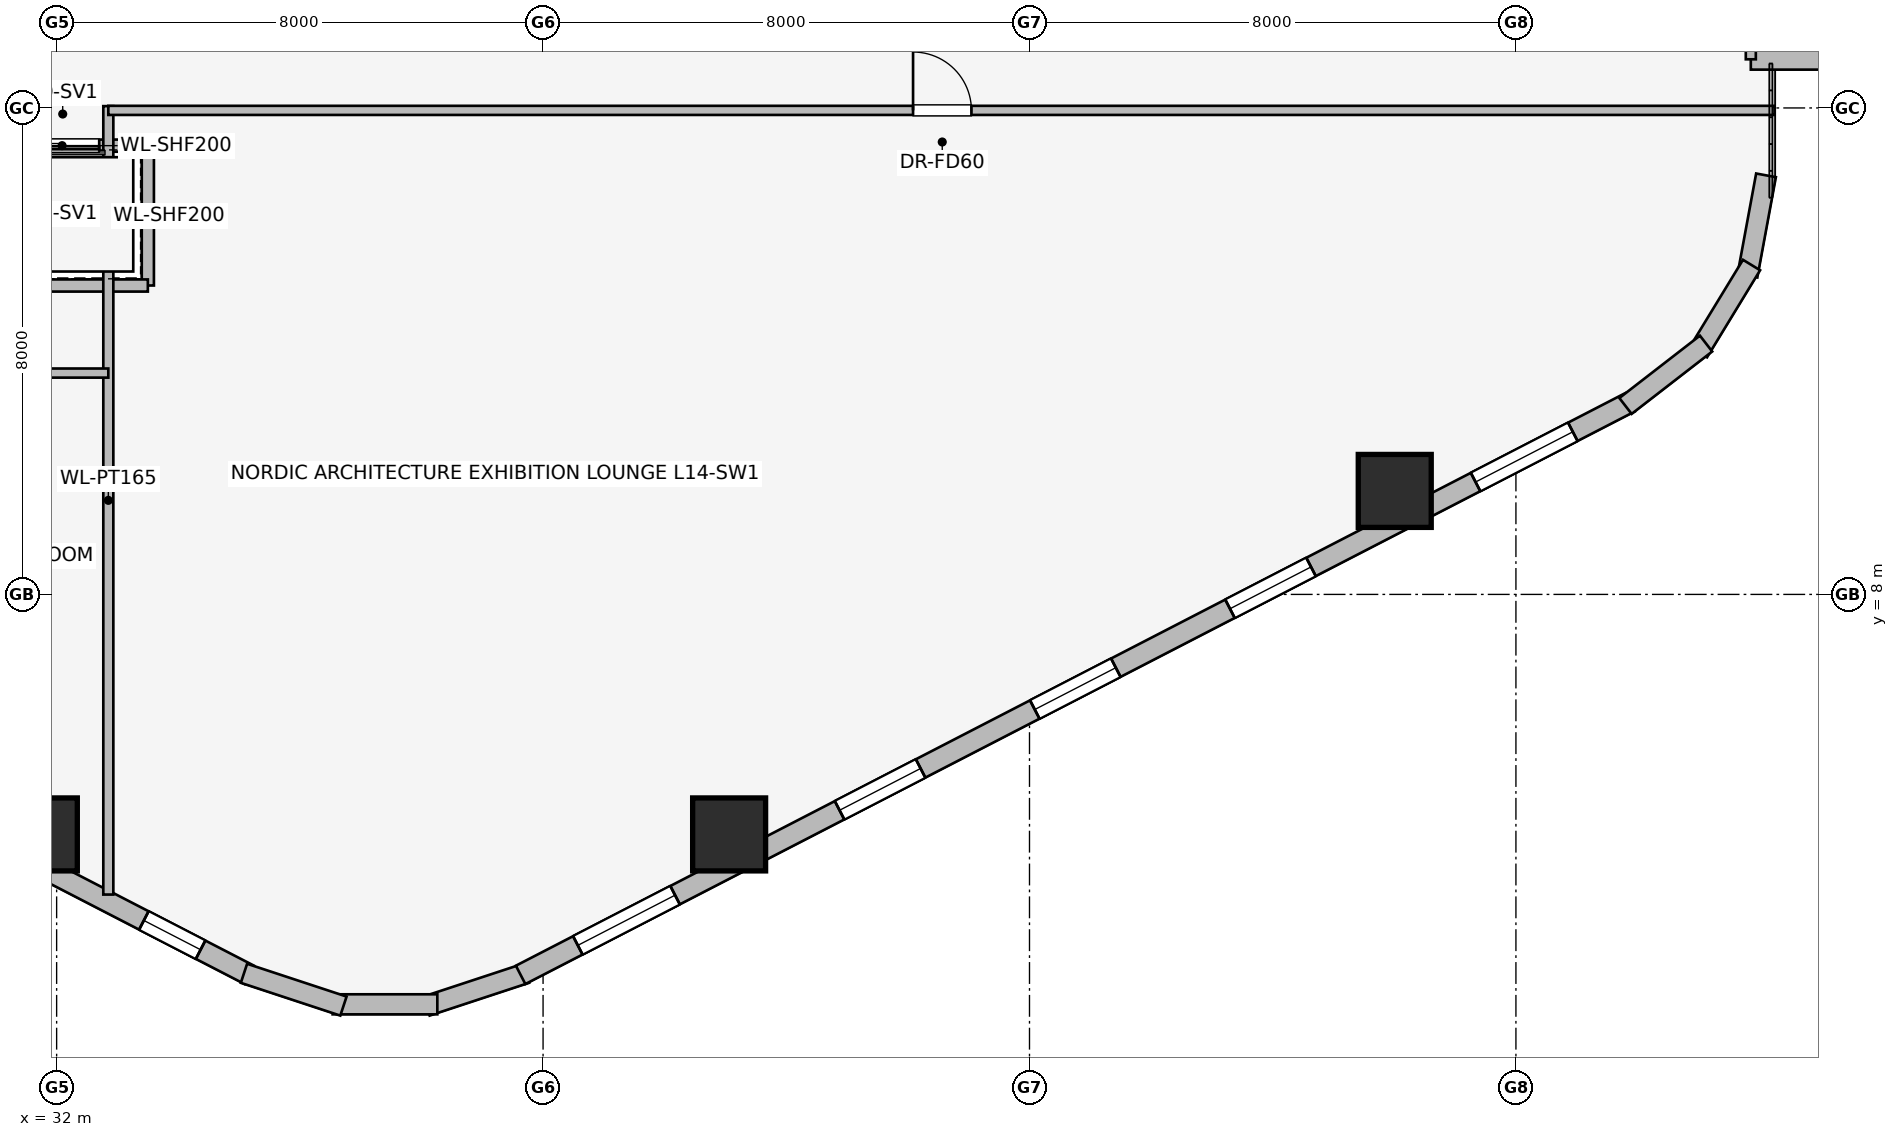
"""IFC4 building model, lengths in metres.
Left out: names, types, materials, properties, quantities, classifications, styles, units other than length and angle.
Written with IfcOpenShell. Run it as: python <this file> out.ifc"""

import sys

from ifc_helpers import new_model, si_unit, direction, frame, frame_2d, origin, origin_2d, place, context, subcontext, project, spatial, rectangle, extrude, element, fill, save


model = new_model("IFC4")
c1 = context("Model", 3, precision=1e-05, world=origin(), true_north=direction((0.0, 1.0)))
c2 = subcontext(c1, "Body", "Model", "MODEL_VIEW")
j1 = project(units=[si_unit("LENGTHUNIT", "METRE"), si_unit("PLANEANGLEUNIT", "RADIAN")], contexts=[c1])
p1 = place(None, origin())
s1 = spatial("IfcSite", under=j1, at=p1, CompositionType="ELEMENT")
p2 = place(p1, origin())
s2 = spatial("IfcBuilding", under=s1, at=p2, CompositionType="ELEMENT")
p3 = place(p2, frame((0.0, 0.0, 56.2)))
s3 = spatial("IfcBuildingStorey", under=s2, at=p3, CompositionType="ELEMENT", Elevation=56.2)
for number, where, z_axis, x_axis in (
    (1, (31.74, 4.053, 0.0), (0.0, 0.0, 1.0), (1.0, 0.0, 0.0)),
    (2, (43.06, 4.053, 0.0), (0.0, 0.0, 1.0), (1.0, 0.0, 0.0)),
    (3, (54.007, 9.702, 0.0), (0.0, 0.0, 1.0), (1.0, 0.0, 0.0)),
):
    element("IfcColumn", number, at=place(p3, frame(where, z_axis=z_axis, x_axis=x_axis)), inside=s3, PredefinedType="COLUMN", context=c2, shape_type="SweptSolid", body=[
        extrude(rectangle(XDim=1.2, YDim=1.2, at=origin_2d()), origin(), (0.0, 0.0, 1.0), 3.65),
    ])
p4 = place(p3, frame((35.169, 1.743, 0.0), z_axis=(0.0, 0.0, 1.0), x_axis=(-0.888634413993, 0.458616264721, 0.0)))
e4 = element("IfcWall", 4, at=p4, inside=s3, PredefinedType="STANDARD", context=c2, shape_type="SweptSolid", body=[
    extrude(rectangle(XDim=20.531, YDim=0.34, at=frame_2d((10.266, 0.0))), origin(), (0.0, 0.0, 1.0), 2.654),
])
p5 = place(p4, frame((0.902, 0.0, 0.75)))
e5 = element("IfcOpeningElement", 5, at=p5, cuts=e4, PredefinedType="OPENING", context=c2, shape_type="SweptSolid", body=[
    extrude(rectangle(XDim=1.05, YDim=1.4, at=frame_2d((0.525, 0.7))), frame((0.0, 0.18, 0.0), z_axis=(0.0, -1.0, 0.0), x_axis=(1.0, 0.0, 0.0)), (0.0, 0.0, 1.0), 0.36),
])
p6 = place(p4, frame((5.903, 0.0, 0.75)))
e6 = element("IfcOpeningElement", 6, at=p6, cuts=e4, PredefinedType="OPENING", context=c2, shape_type="SweptSolid", body=[
    extrude(rectangle(XDim=1.5, YDim=1.5, at=frame_2d((0.75, 0.75))), frame((0.0, 0.18, 0.0), z_axis=(0.0, -1.0, 0.0), x_axis=(1.0, 0.0, 0.0)), (0.0, 0.0, 1.0), 0.36),
])
p7 = place(p4, frame((9.516, 0.0, 0.75)))
e7 = element("IfcOpeningElement", 7, at=p7, cuts=e4, PredefinedType="OPENING", context=c2, shape_type="SweptSolid", body=[
    extrude(rectangle(XDim=1.5, YDim=1.5, at=frame_2d((0.75, 0.75))), frame((0.0, 0.18, 0.0), z_axis=(0.0, -1.0, 0.0), x_axis=(1.0, 0.0, 0.0)), (0.0, 0.0, 1.0), 0.36),
])
p8 = place(p4, frame((13.129, 0.0, 0.75)))
e8 = element("IfcOpeningElement", 8, at=p8, cuts=e4, PredefinedType="OPENING", context=c2, shape_type="SweptSolid", body=[
    extrude(rectangle(XDim=1.5, YDim=1.5, at=frame_2d((0.75, 0.75))), frame((0.0, 0.18, 0.0), z_axis=(0.0, -1.0, 0.0), x_axis=(1.0, 0.0, 0.0)), (0.0, 0.0, 1.0), 0.36),
])
p9 = place(p4, frame((17.673, 0.0, 0.75)))
e9 = element("IfcOpeningElement", 9, at=p9, cuts=e4, PredefinedType="OPENING", context=c2, shape_type="SweptSolid", body=[
    extrude(rectangle(XDim=1.8, YDim=1.5, at=frame_2d((0.9, 0.75))), frame((0.0, 0.18, 0.0), z_axis=(0.0, -1.0, 0.0), x_axis=(1.0, 0.0, 0.0)), (0.0, 0.0, 1.0), 0.36),
])
p10 = place(p3, frame((39.719, 1.769, 0.0), z_axis=(0.0, 0.0, 1.0), x_axis=(-0.94976901097, -0.312951794691, 0.0)))
e10 = element("IfcWall", 10, at=p10, inside=s3, PredefinedType="STANDARD", context=c2, shape_type="SweptSolid", body=[
    extrude(rectangle(XDim=1.722, YDim=0.33, at=frame_2d((0.861, 0.0))), origin(), (0.0, 0.0, 1.0), 3.36),
])
p11 = place(p3, frame((38.261, 1.259, 0.0), z_axis=(0.0, 0.0, 1.0), x_axis=(-1.0, 0.0, 0.0)))
e11 = element("IfcWall", 11, at=p11, inside=s3, PredefinedType="STANDARD", context=c2, shape_type="SweptSolid", body=[
    extrude(rectangle(XDim=1.722, YDim=0.33, at=frame_2d((0.861, 0.0))), origin(), (0.0, 0.0, 1.0), 3.36),
])
p12 = place(p3, frame((36.717, 1.23, 0.0), z_axis=(0.0, 0.0, 1.0), x_axis=(-0.94976901097, 0.312951794691, 0.0)))
e12 = element("IfcWall", 12, at=p12, inside=s3, PredefinedType="STANDARD", context=c2, shape_type="SweptSolid", body=[
    extrude(rectangle(XDim=1.722, YDim=0.33, at=frame_2d((0.861, 0.0))), origin(), (0.0, 0.0, 1.0), 3.36),
])
p13 = place(p3, frame((57.876, 11.159, 0.0), z_axis=(0.0, 0.0, 1.0), x_axis=(-0.888634413993, -0.458616264721, 0.0)))
e13 = element("IfcWall", 13, at=p13, inside=s3, PredefinedType="STANDARD", context=c2, shape_type="SweptSolid", body=[
    extrude(rectangle(XDim=20.531, YDim=0.34, at=frame_2d((10.266, 0.0))), origin(), (0.0, 0.0, 1.0), 2.654),
])
p14 = place(p13, frame((1.058, 0.0, 0.75)))
e14 = element("IfcOpeningElement", 14, at=p14, cuts=e13, PredefinedType="OPENING", context=c2, shape_type="SweptSolid", body=[
    extrude(rectangle(XDim=1.8, YDim=1.5, at=frame_2d((0.9, 0.75))), frame((0.0, 0.18, 0.0), z_axis=(0.0, -1.0, 0.0), x_axis=(1.0, 0.0, 0.0)), (0.0, 0.0, 1.0), 0.36),
])
p15 = place(p13, frame((5.903, 0.0, 0.75)))
e15 = element("IfcOpeningElement", 15, at=p15, cuts=e13, PredefinedType="OPENING", context=c2, shape_type="SweptSolid", body=[
    extrude(rectangle(XDim=1.5, YDim=1.5, at=frame_2d((0.75, 0.75))), frame((0.0, 0.18, 0.0), z_axis=(0.0, -1.0, 0.0), x_axis=(1.0, 0.0, 0.0)), (0.0, 0.0, 1.0), 0.36),
])
p16 = place(p13, frame((9.516, 0.0, 0.75)))
e16 = element("IfcOpeningElement", 16, at=p16, cuts=e13, PredefinedType="OPENING", context=c2, shape_type="SweptSolid", body=[
    extrude(rectangle(XDim=1.5, YDim=1.5, at=frame_2d((0.75, 0.75))), frame((0.0, 0.18, 0.0), z_axis=(0.0, -1.0, 0.0), x_axis=(1.0, 0.0, 0.0)), (0.0, 0.0, 1.0), 0.36),
])
p17 = place(p13, frame((13.129, 0.0, 0.75)))
e17 = element("IfcOpeningElement", 17, at=p17, cuts=e13, PredefinedType="OPENING", context=c2, shape_type="SweptSolid", body=[
    extrude(rectangle(XDim=1.5, YDim=1.5, at=frame_2d((0.75, 0.75))), frame((0.0, 0.18, 0.0), z_axis=(0.0, -1.0, 0.0), x_axis=(1.0, 0.0, 0.0)), (0.0, 0.0, 1.0), 0.36),
])
p18 = place(p13, frame((17.673, 0.0, 0.75)))
e18 = element("IfcOpeningElement", 18, at=p18, cuts=e13, PredefinedType="OPENING", context=c2, shape_type="SweptSolid", body=[
    extrude(rectangle(XDim=1.8, YDim=1.5, at=frame_2d((0.9, 0.75))), frame((0.0, 0.18, 0.0), z_axis=(0.0, -1.0, 0.0), x_axis=(1.0, 0.0, 0.0)), (0.0, 0.0, 1.0), 0.36),
])
p19 = place(p3, frame((60.113, 14.892, 0.0), z_axis=(0.0, 0.0, 1.0), x_axis=(-0.181714143354, -0.983351397063, 0.0)))
e19 = element("IfcWall", 19, at=p19, inside=s3, PredefinedType="STANDARD", context=c2, shape_type="SweptSolid", body=[
    extrude(rectangle(XDim=1.678, YDim=0.33, at=frame_2d((0.839, 0.0))), origin(), (0.0, 0.0, 1.0), 3.36),
])
p20 = place(p3, frame((59.875, 13.417, 0.0), z_axis=(0.0, 0.0, 1.0), x_axis=(-0.520584129191, -0.853810379671, 0.0)))
e20 = element("IfcWall", 20, at=p20, inside=s3, PredefinedType="STANDARD", context=c2, shape_type="SweptSolid", body=[
    extrude(rectangle(XDim=1.677, YDim=0.33, at=frame_2d((0.838, 0.0))), origin(), (0.0, 0.0, 1.0), 3.36),
])
p21 = place(p3, frame((59.127, 12.125, 0.0), z_axis=(0.0, 0.0, 1.0), x_axis=(-0.790691856293, -0.61221433207, 0.0)))
e21 = element("IfcWall", 21, at=p21, inside=s3, PredefinedType="STANDARD", context=c2, shape_type="SweptSolid", body=[
    extrude(rectangle(XDim=1.676, YDim=0.33, at=frame_2d((0.838, 0.0))), origin(), (0.0, 0.0, 1.0), 3.36),
])
p22 = place(p3, frame((78.863, 16.8, 0.0), z_axis=(0.0, 0.0, 1.0), x_axis=(-1.0, 0.0, 0.0)))
e22 = element("IfcWall", 22, at=p22, inside=s3, PredefinedType="STANDARD", context=c2, shape_type="SweptSolid", body=[
    extrude(rectangle(XDim=19.0, YDim=0.34, at=frame_2d((9.5, 0.0))), origin(), (0.0, 0.0, 1.0), 3.36),
])
p23 = place(p22, frame((2.633, 0.0, 0.75)))
e23 = element("IfcOpeningElement", 23, at=p23, cuts=e22, PredefinedType="OPENING", context=c2, shape_type="SweptSolid", body=[
    extrude(rectangle(XDim=1.8, YDim=1.5, at=frame_2d((0.9, 0.75))), frame((0.0, 0.18, 0.0), z_axis=(0.0, -1.0, 0.0), x_axis=(1.0, 0.0, 0.0)), (0.0, 0.0, 1.0), 0.36),
])
p24 = place(p22, frame((8.6, 0.0, 0.75)))
e24 = element("IfcOpeningElement", 24, at=p24, cuts=e22, PredefinedType="OPENING", context=c2, shape_type="SweptSolid", body=[
    extrude(rectangle(XDim=1.8, YDim=1.5, at=frame_2d((0.9, 0.75))), frame((0.0, 0.18, 0.0), z_axis=(0.0, -1.0, 0.0), x_axis=(1.0, 0.0, 0.0)), (0.0, 0.0, 1.0), 0.36),
])
p25 = place(p22, frame((14.567, 0.0, 0.75)))
e25 = element("IfcOpeningElement", 25, at=p25, cuts=e22, PredefinedType="OPENING", context=c2, shape_type="SweptSolid", body=[
    extrude(rectangle(XDim=1.8, YDim=1.5, at=frame_2d((0.9, 0.75))), frame((0.0, 0.18, 0.0), z_axis=(0.0, -1.0, 0.0), x_axis=(1.0, 0.0, 0.0)), (0.0, 0.0, 1.0), 0.36),
])
p26 = place(p3, frame((33.5, 15.38, 0.0), z_axis=(0.0, 0.0, 1.0), x_axis=(-1.0, 0.0, 0.0)))
e26 = element("IfcWall", 26, at=p26, inside=s3, PredefinedType="PARTITIONING", context=c2, shape_type="SweptSolid", body=[
    extrude(rectangle(XDim=2.82, YDim=0.2, at=frame_2d((1.41, 0.0))), origin(), (0.0, 0.0, 1.0), 3.36),
])
p27 = place(p26, frame((0.8, 0.0, 0.0)))
e27 = element("IfcOpeningElement", 27, at=p27, cuts=e26, PredefinedType="OPENING", context=c2, shape_type="SweptSolid", body=[
    extrude(rectangle(XDim=1.2, YDim=2.2, at=frame_2d((0.6, 1.1))), frame((0.0, 0.11, 0.0), z_axis=(0.0, -1.0, 0.0), x_axis=(1.0, 0.0, 0.0)), (0.0, 0.0, 1.0), 0.22),
])
p28 = place(p3, frame((33.5, 13.08, 0.0), z_axis=(0.0, 0.0, 1.0), x_axis=(0.0, 1.0, 0.0)))
e28 = element("IfcWall", 28, at=p28, inside=s3, PredefinedType="PARTITIONING", context=c2, shape_type="SweptSolid", body=[
    extrude(rectangle(XDim=2.3, YDim=0.2, at=frame_2d((1.15, 0.0))), origin(), (0.0, 0.0, 1.0), 3.36),
])
p29 = place(p3, frame((30.879, 13.08, 0.0), z_axis=(0.0, 0.0, 1.0), x_axis=(1.0, 0.0, 0.0)))
e29 = element("IfcWall", 29, at=p29, inside=s3, PredefinedType="PARTITIONING", context=c2, shape_type="SweptSolid", body=[
    extrude(rectangle(XDim=2.621, YDim=0.2, at=frame_2d((1.311, 0.0))), origin(), (0.0, 0.0, 1.0), 3.36),
])
p30 = place(p3, frame((32.85, 3.064, 0.0), z_axis=(0.0, 0.0, 1.0), x_axis=(0.0, 1.0, 0.0)))
e30 = element("IfcWall", 30, at=p30, inside=s3, PredefinedType="PARTITIONING", context=c2, shape_type="SweptSolid", body=[
    extrude(rectangle(XDim=12.966, YDim=0.165, at=frame_2d((6.483, 0.0))), origin(), (0.0, 0.0, 1.0), 3.36),
])
p31 = place(p3, frame((16.487, 11.64, 0.0), z_axis=(0.0, 0.0, 1.0), x_axis=(1.0, 0.0, 0.0)))
e31 = element("IfcWall", 31, at=p31, inside=s3, PredefinedType="PARTITIONING", context=c2, shape_type="SweptSolid", body=[
    extrude(rectangle(XDim=16.363, YDim=0.15, at=frame_2d((8.182, 0.0))), origin(), (0.0, 0.0, 1.0), 3.36),
])
p32 = place(p31, frame((6.513, 0.0, 0.0)))
e32 = element("IfcOpeningElement", 32, at=p32, cuts=e31, PredefinedType="OPENING", context=c2, shape_type="SweptSolid", body=[
    extrude(rectangle(XDim=0.9, YDim=2.0, at=frame_2d((0.45, 1.0))), frame((0.0, 0.085, 0.0), z_axis=(0.0, -1.0, 0.0), x_axis=(1.0, 0.0, 0.0)), (0.0, 0.0, 1.0), 0.17),
])
p33 = place(p3, frame((32.85, 15.96, 0.0), z_axis=(0.0, 0.0, 1.0), x_axis=(1.0, 0.0, 0.0)))
e33 = element("IfcWall", 33, at=p33, inside=s3, PredefinedType="PARTITIONING", context=c2, shape_type="SweptSolid", body=[
    extrude(rectangle(XDim=27.403, YDim=0.15, at=frame_2d((13.701, 0.0))), origin(), (0.0, 0.0, 1.0), 3.36),
])
p34 = place(p33, frame((13.235, 0.0, 0.0)))
e34 = element("IfcOpeningElement", 34, at=p34, cuts=e33, PredefinedType="OPENING", context=c2, shape_type="SweptSolid", body=[
    extrude(rectangle(XDim=0.96, YDim=2.0, at=frame_2d((0.48, 1.0))), frame((0.0, 0.085, 0.0), z_axis=(0.0, -1.0, 0.0), x_axis=(1.0, 0.0, 0.0)), (0.0, 0.0, 1.0), 0.17),
])
p35 = place(p3, frame((59.863, 16.8, 0.0), z_axis=(0.0, 0.0, 1.0), x_axis=(0.0, 1.0, 0.0)))
e35 = element("IfcWall", 35, at=p35, inside=s3, PredefinedType="PARTITIONING", context=c2, shape_type="SweptSolid", body=[
    extrude(rectangle(XDim=14.4, YDim=0.165, at=frame_2d((7.2, 0.0))), origin(), (0.0, 0.0, 1.0), 2.654),
])
p36 = place(p35, frame((2.45, 0.0, 0.0)))
e36 = element("IfcOpeningElement", 36, at=p36, cuts=e35, PredefinedType="OPENING", context=c2, shape_type="SweptSolid", body=[
    extrude(rectangle(XDim=0.96, YDim=2.0, at=frame_2d((0.48, 1.0))), frame((0.0, 0.093, 0.0), z_axis=(0.0, -1.0, 0.0), x_axis=(1.0, 0.0, 0.0)), (0.0, 0.0, 1.0), 0.185),
])
p37 = place(p5, origin())
e37 = element("IfcWindow", 37, at=p37, inside=s3, PartitioningType="SINGLE_PANEL", PredefinedType="WINDOW", context=c2, shape_type="SweptSolid", body=[
    extrude(rectangle(XDim=1.05, YDim=1.4, at=frame_2d((0.525, 0.7))), frame((0.0, 0.03, 0.0), z_axis=(0.0, -1.0, 0.0), x_axis=(1.0, 0.0, 0.0)), (0.0, 0.0, 1.0), 0.06),
])
fill(e5, e37)
p38 = place(p14, origin())
e38 = element("IfcWindow", 38, at=p38, inside=s3, PartitioningType="SINGLE_PANEL", PredefinedType="WINDOW", context=c2, shape_type="SweptSolid", body=[
    extrude(rectangle(XDim=1.8, YDim=1.5, at=frame_2d((0.9, 0.75))), frame((0.0, 0.03, 0.0), z_axis=(0.0, -1.0, 0.0), x_axis=(1.0, 0.0, 0.0)), (0.0, 0.0, 1.0), 0.06),
])
fill(e14, e38)
p39 = place(p15, origin())
e39 = element("IfcWindow", 39, at=p39, inside=s3, PartitioningType="SINGLE_PANEL", PredefinedType="WINDOW", context=c2, shape_type="SweptSolid", body=[
    extrude(rectangle(XDim=1.5, YDim=1.5, at=frame_2d((0.75, 0.75))), frame((0.0, 0.03, 0.0), z_axis=(0.0, -1.0, 0.0), x_axis=(1.0, 0.0, 0.0)), (0.0, 0.0, 1.0), 0.06),
])
fill(e15, e39)
p40 = place(p16, origin())
e40 = element("IfcWindow", 40, at=p40, inside=s3, PartitioningType="SINGLE_PANEL", PredefinedType="WINDOW", context=c2, shape_type="SweptSolid", body=[
    extrude(rectangle(XDim=1.5, YDim=1.5, at=frame_2d((0.75, 0.75))), frame((0.0, 0.03, 0.0), z_axis=(0.0, -1.0, 0.0), x_axis=(1.0, 0.0, 0.0)), (0.0, 0.0, 1.0), 0.06),
])
fill(e16, e40)
p41 = place(p17, origin())
e41 = element("IfcWindow", 41, at=p41, inside=s3, PartitioningType="SINGLE_PANEL", PredefinedType="WINDOW", context=c2, shape_type="SweptSolid", body=[
    extrude(rectangle(XDim=1.5, YDim=1.5, at=frame_2d((0.75, 0.75))), frame((0.0, 0.03, 0.0), z_axis=(0.0, -1.0, 0.0), x_axis=(1.0, 0.0, 0.0)), (0.0, 0.0, 1.0), 0.06),
])
fill(e17, e41)
p42 = place(p18, origin())
e42 = element("IfcWindow", 42, at=p42, inside=s3, PartitioningType="SINGLE_PANEL", PredefinedType="WINDOW", context=c2, shape_type="SweptSolid", body=[
    extrude(rectangle(XDim=1.8, YDim=1.5, at=frame_2d((0.9, 0.75))), frame((0.0, 0.03, 0.0), z_axis=(0.0, -1.0, 0.0), x_axis=(1.0, 0.0, 0.0)), (0.0, 0.0, 1.0), 0.06),
])
fill(e18, e42)
p43 = place(p27, origin())
e43 = element("IfcDoor", 43, at=p43, inside=s3, OperationType="SLIDING_TO_RIGHT", PredefinedType="DOOR", context=c2, shape_type="SweptSolid", body=[
    extrude(rectangle(XDim=1.2, YDim=2.2, at=frame_2d((0.6, 1.1))), frame((0.0, 0.025, 0.0), z_axis=(0.0, -1.0, 0.0), x_axis=(1.0, 0.0, 0.0)), (0.0, 0.0, 1.0), 0.05),
])
fill(e27, e43)
p44 = place(p34, origin())
e44 = element("IfcDoor", 44, at=p44, inside=s3, OperationType="SINGLE_SWING_LEFT", PredefinedType="DOOR", context=c2, shape_type="SweptSolid", body=[
    extrude(rectangle(XDim=0.96, YDim=2.0, at=frame_2d((0.48, 1.0))), frame((0.0, 0.025, 0.0), z_axis=(0.0, -1.0, 0.0), x_axis=(1.0, 0.0, 0.0)), (0.0, 0.0, 1.0), 0.05),
])
fill(e34, e44)
save(model, sys.argv[1])
